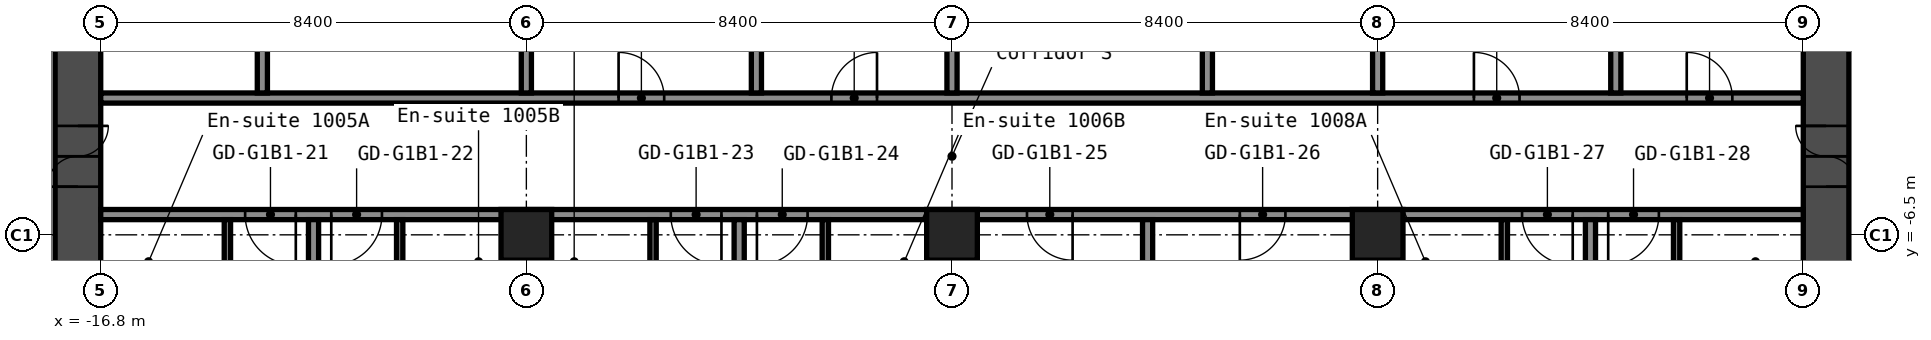
"""IFC4 building model, lengths in metres.
Left out: names, types, materials, properties, quantities, classifications, styles, units other than length and angle.
Written with IfcOpenShell. Run it as: python <this file> out.ifc"""

import sys

from ifc_helpers import new_model, si_unit, direction, frame, frame_2d, origin, origin_2d, place, context, subcontext, project, spatial, rectangle, hollow_rectangle, extrude, element, fill, save


model = new_model("IFC4")
c1 = context("Model", 3, precision=1e-05, world=origin(), true_north=direction((0.0, 1.0)))
c2 = subcontext(c1, "Body", "Model", "MODEL_VIEW")
j1 = project(units=[si_unit("LENGTHUNIT", "METRE"), si_unit("PLANEANGLEUNIT", "RADIAN")], contexts=[c1])
p1 = place(None, origin())
s1 = spatial("IfcSite", under=j1, at=p1, CompositionType="ELEMENT")
p2 = place(p1, origin())
s2 = spatial("IfcBuilding", under=s1, at=p2, CompositionType="ELEMENT")
p3 = place(p2, frame((0.0, 0.0, 39.0)))
s3 = spatial("IfcBuildingStorey", under=s2, at=p3, CompositionType="ELEMENT", Elevation=39.0)
for number, where, z_axis, x_axis in (
    (1, (-8.4, -6.5, 0.0), (0.0, 0.0, 1.0), (1.0, 0.0, 0.0)),
    (2, (0.0, -6.5, 0.0), (0.0, 0.0, 1.0), (1.0, 0.0, 0.0)),
    (3, (8.4, -6.5, 0.0), (0.0, 0.0, 1.0), (1.0, 0.0, 0.0)),
):
    element("IfcColumn", number, at=place(p3, frame(where, z_axis=z_axis, x_axis=x_axis)), inside=s3, PredefinedType="COLUMN", context=c2, shape_type="SweptSolid", body=[
        extrude(hollow_rectangle(XDim=1.0, YDim=1.0, WallThickness=0.04, at=origin_2d()), origin(), (0.0, 0.0, 1.0), 2.8),
    ])
p4 = place(p3, frame((-17.25, -8.4, 0.0), z_axis=(0.0, 0.0, 1.0), x_axis=(0.0, 1.0, 0.0)))
e4 = element("IfcWall", 4, at=p4, inside=s3, PredefinedType="SHEAR", context=c2, shape_type="SweptSolid", body=[
    extrude(rectangle(XDim=16.8, YDim=0.9, at=frame_2d((8.4, 0.0))), origin(), (0.0, 0.0, 1.0), 2.8),
])
p5 = place(p4, frame((12.75, 0.0, 0.0)))
e5 = element("IfcOpeningElement", 5, at=p5, cuts=e4, PredefinedType="OPENING", context=c2, shape_type="SweptSolid", body=[
    extrude(rectangle(XDim=1.2, YDim=2.1, at=frame_2d((0.6, 1.05))), frame((0.0, 0.46, 0.0), z_axis=(0.0, -1.0, 0.0), x_axis=(1.0, 0.0, 0.0)), (0.0, 0.0, 1.0), 0.92),
])
p6 = place(p4, frame((2.85, 0.0, 0.0)))
e6 = element("IfcOpeningElement", 6, at=p6, cuts=e4, PredefinedType="OPENING", context=c2, shape_type="SweptSolid", body=[
    extrude(rectangle(XDim=1.2, YDim=2.1, at=frame_2d((0.6, 1.05))), frame((0.0, 0.46, 0.0), z_axis=(0.0, -1.0, 0.0), x_axis=(1.0, 0.0, 0.0)), (0.0, 0.0, 1.0), 0.92),
])
p7 = place(p3, frame((17.25, -8.4, 0.0), z_axis=(0.0, 0.0, 1.0), x_axis=(0.0, 1.0, 0.0)))
e7 = element("IfcWall", 7, at=p7, inside=s3, PredefinedType="SHEAR", context=c2, shape_type="SweptSolid", body=[
    extrude(rectangle(XDim=16.8, YDim=0.9, at=frame_2d((8.4, 0.0))), origin(), (0.0, 0.0, 1.0), 2.8),
])
p8 = place(p7, frame((12.75, 0.0, 0.0)))
e8 = element("IfcOpeningElement", 8, at=p8, cuts=e7, PredefinedType="OPENING", context=c2, shape_type="SweptSolid", body=[
    extrude(rectangle(XDim=1.2, YDim=2.1, at=frame_2d((0.6, 1.05))), frame((0.0, 0.46, 0.0), z_axis=(0.0, -1.0, 0.0), x_axis=(1.0, 0.0, 0.0)), (0.0, 0.0, 1.0), 0.92),
])
p9 = place(p7, frame((2.85, 0.0, 0.0)))
e9 = element("IfcOpeningElement", 9, at=p9, cuts=e7, PredefinedType="OPENING", context=c2, shape_type="SweptSolid", body=[
    extrude(rectangle(XDim=1.2, YDim=2.1, at=frame_2d((0.6, 1.05))), frame((0.0, 0.46, 0.0), z_axis=(0.0, -1.0, 0.0), x_axis=(1.0, 0.0, 0.0)), (0.0, 0.0, 1.0), 0.92),
])
p10 = place(p3, frame((-16.8, -6.1, 0.0), z_axis=(0.0, 0.0, 1.0), x_axis=(1.0, 0.0, 0.0)))
e10 = element("IfcWall", 10, at=p10, inside=s3, PredefinedType="PARTITIONING", context=c2, shape_type="SweptSolid", body=[
    extrude(rectangle(XDim=33.6, YDim=0.2, at=frame_2d((16.8, 0.0))), origin(), (0.0, 0.0, 1.0), 2.8),
])
p11 = place(p10, frame((2.85, 0.0, 0.0)))
e11 = element("IfcOpeningElement", 11, at=p11, cuts=e10, PredefinedType="OPENING", context=c2, shape_type="SweptSolid", body=[
    extrude(rectangle(XDim=1.0, YDim=2.1, at=frame_2d((0.5, 1.05))), frame((0.0, 0.11, 0.0), z_axis=(0.0, -1.0, 0.0), x_axis=(1.0, 0.0, 0.0)), (0.0, 0.0, 1.0), 0.22),
])
p12 = place(p10, frame((4.55, 0.0, 0.0)))
e12 = element("IfcOpeningElement", 12, at=p12, cuts=e10, PredefinedType="OPENING", context=c2, shape_type="SweptSolid", body=[
    extrude(rectangle(XDim=1.0, YDim=2.1, at=frame_2d((0.5, 1.05))), frame((0.0, 0.11, 0.0), z_axis=(0.0, -1.0, 0.0), x_axis=(1.0, 0.0, 0.0)), (0.0, 0.0, 1.0), 0.22),
])
p13 = place(p10, frame((11.25, 0.0, 0.0)))
e13 = element("IfcOpeningElement", 13, at=p13, cuts=e10, PredefinedType="OPENING", context=c2, shape_type="SweptSolid", body=[
    extrude(rectangle(XDim=1.0, YDim=2.1, at=frame_2d((0.5, 1.05))), frame((0.0, 0.11, 0.0), z_axis=(0.0, -1.0, 0.0), x_axis=(1.0, 0.0, 0.0)), (0.0, 0.0, 1.0), 0.22),
])
p14 = place(p10, frame((12.95, 0.0, 0.0)))
e14 = element("IfcOpeningElement", 14, at=p14, cuts=e10, PredefinedType="OPENING", context=c2, shape_type="SweptSolid", body=[
    extrude(rectangle(XDim=1.0, YDim=2.1, at=frame_2d((0.5, 1.05))), frame((0.0, 0.11, 0.0), z_axis=(0.0, -1.0, 0.0), x_axis=(1.0, 0.0, 0.0)), (0.0, 0.0, 1.0), 0.22),
])
p15 = place(p10, frame((18.28, 0.0, 0.0)))
e15 = element("IfcOpeningElement", 15, at=p15, cuts=e10, PredefinedType="OPENING", context=c2, shape_type="SweptSolid", body=[
    extrude(rectangle(XDim=0.9, YDim=2.1, at=frame_2d((0.45, 1.05))), frame((0.0, 0.11, 0.0), z_axis=(0.0, -1.0, 0.0), x_axis=(1.0, 0.0, 0.0)), (0.0, 0.0, 1.0), 0.22),
])
p16 = place(p10, frame((22.48, 0.0, 0.0)))
e16 = element("IfcOpeningElement", 16, at=p16, cuts=e10, PredefinedType="OPENING", context=c2, shape_type="SweptSolid", body=[
    extrude(rectangle(XDim=0.9, YDim=2.1, at=frame_2d((0.45, 1.05))), frame((0.0, 0.11, 0.0), z_axis=(0.0, -1.0, 0.0), x_axis=(1.0, 0.0, 0.0)), (0.0, 0.0, 1.0), 0.22),
])
p17 = place(p10, frame((28.05, 0.0, 0.0)))
e17 = element("IfcOpeningElement", 17, at=p17, cuts=e10, PredefinedType="OPENING", context=c2, shape_type="SweptSolid", body=[
    extrude(rectangle(XDim=1.0, YDim=2.1, at=frame_2d((0.5, 1.05))), frame((0.0, 0.11, 0.0), z_axis=(0.0, -1.0, 0.0), x_axis=(1.0, 0.0, 0.0)), (0.0, 0.0, 1.0), 0.22),
])
p18 = place(p10, frame((29.75, 0.0, 0.0)))
e18 = element("IfcOpeningElement", 18, at=p18, cuts=e10, PredefinedType="OPENING", context=c2, shape_type="SweptSolid", body=[
    extrude(rectangle(XDim=1.0, YDim=2.1, at=frame_2d((0.5, 1.05))), frame((0.0, 0.11, 0.0), z_axis=(0.0, -1.0, 0.0), x_axis=(1.0, 0.0, 0.0)), (0.0, 0.0, 1.0), 0.22),
])
p19 = place(p3, frame((-16.8, -3.8, 0.0), z_axis=(0.0, 0.0, 1.0), x_axis=(1.0, 0.0, 0.0)))
e19 = element("IfcWall", 19, at=p19, inside=s3, PredefinedType="PARTITIONING", context=c2, shape_type="SweptSolid", body=[
    extrude(rectangle(XDim=33.6, YDim=0.2, at=frame_2d((16.8, 0.0))), origin(), (0.0, 0.0, 1.0), 2.8),
])
p20 = place(p19, frame((10.22, 0.0, 0.0)))
e20 = element("IfcOpeningElement", 20, at=p20, cuts=e19, PredefinedType="OPENING", context=c2, shape_type="SweptSolid", body=[
    extrude(rectangle(XDim=0.9, YDim=2.1, at=frame_2d((0.45, 1.05))), frame((0.0, 0.11, 0.0), z_axis=(0.0, -1.0, 0.0), x_axis=(1.0, 0.0, 0.0)), (0.0, 0.0, 1.0), 0.22),
])
p21 = place(p19, frame((14.42, 0.0, 0.0)))
e21 = element("IfcOpeningElement", 21, at=p21, cuts=e19, PredefinedType="OPENING", context=c2, shape_type="SweptSolid", body=[
    extrude(rectangle(XDim=0.9, YDim=2.1, at=frame_2d((0.45, 1.05))), frame((0.0, 0.11, 0.0), z_axis=(0.0, -1.0, 0.0), x_axis=(1.0, 0.0, 0.0)), (0.0, 0.0, 1.0), 0.22),
])
p22 = place(p19, frame((27.1, 0.0, 0.0)))
e22 = element("IfcOpeningElement", 22, at=p22, cuts=e19, PredefinedType="OPENING", context=c2, shape_type="SweptSolid", body=[
    extrude(rectangle(XDim=0.9, YDim=2.1, at=frame_2d((0.45, 1.05))), frame((0.0, 0.11, 0.0), z_axis=(0.0, -1.0, 0.0), x_axis=(1.0, 0.0, 0.0)), (0.0, 0.0, 1.0), 0.22),
])
p23 = place(p19, frame((31.3, 0.0, 0.0)))
e23 = element("IfcOpeningElement", 23, at=p23, cuts=e19, PredefinedType="OPENING", context=c2, shape_type="SweptSolid", body=[
    extrude(rectangle(XDim=0.9, YDim=2.1, at=frame_2d((0.45, 1.05))), frame((0.0, 0.11, 0.0), z_axis=(0.0, -1.0, 0.0), x_axis=(1.0, 0.0, 0.0)), (0.0, 0.0, 1.0), 0.22),
])
p24 = place(p3, frame((-14.3, -9.1, 0.0), z_axis=(0.0, 0.0, 1.0), x_axis=(0.0, 1.0, 0.0)))
e24 = element("IfcWall", 24, at=p24, inside=s3, PredefinedType="PARTITIONING", context=c2, shape_type="SweptSolid", body=[
    extrude(rectangle(XDim=2.9, YDim=0.125, at=frame_2d((1.45, 0.0))), origin(), (0.0, 0.0, 1.0), 2.8),
])
p25 = place(p24, frame((0.6, 0.0, 0.0)))
e25 = element("IfcOpeningElement", 25, at=p25, cuts=e24, PredefinedType="OPENING", context=c2, shape_type="SweptSolid", body=[
    extrude(rectangle(XDim=0.8, YDim=2.1, at=frame_2d((0.4, 1.05))), frame((0.0, 0.073, 0.0), z_axis=(0.0, -1.0, 0.0), x_axis=(1.0, 0.0, 0.0)), (0.0, 0.0, 1.0), 0.145),
])
p26 = place(p3, frame((-13.61, -3.7, 0.0), z_axis=(0.0, 0.0, 1.0), x_axis=(0.0, 1.0, 0.0)))
e26 = element("IfcWall", 26, at=p26, inside=s3, PredefinedType="PARTITIONING", context=c2, shape_type="SweptSolid", body=[
    extrude(rectangle(XDim=7.4, YDim=0.2, at=frame_2d((3.7, 0.0))), origin(), (0.0, 0.0, 1.0), 2.8),
])
p27 = place(p3, frame((-12.6, -20.3, 0.0), z_axis=(0.0, 0.0, 1.0), x_axis=(0.0, 1.0, 0.0)))
e27 = element("IfcWall", 27, at=p27, inside=s3, PredefinedType="PARTITIONING", context=c2, shape_type="SweptSolid", body=[
    extrude(rectangle(XDim=14.1, YDim=0.2, at=frame_2d((7.05, 0.0))), origin(), (0.0, 0.0, 1.0), 2.8),
])
p28 = place(p3, frame((-10.9, -9.1, 0.0), z_axis=(0.0, 0.0, 1.0), x_axis=(0.0, 1.0, 0.0)))
e28 = element("IfcWall", 28, at=p28, inside=s3, PredefinedType="PARTITIONING", context=c2, shape_type="SweptSolid", body=[
    extrude(rectangle(XDim=2.9, YDim=0.125, at=frame_2d((1.45, 0.0))), origin(), (0.0, 0.0, 1.0), 2.8),
])
p29 = place(p28, frame((0.6, 0.0, 0.0)))
e29 = element("IfcOpeningElement", 29, at=p29, cuts=e28, PredefinedType="OPENING", context=c2, shape_type="SweptSolid", body=[
    extrude(rectangle(XDim=0.8, YDim=2.1, at=frame_2d((0.4, 1.05))), frame((0.0, 0.073, 0.0), z_axis=(0.0, -1.0, 0.0), x_axis=(1.0, 0.0, 0.0)), (0.0, 0.0, 1.0), 0.145),
])
p30 = place(p3, frame((-8.4, -20.3, 0.0), z_axis=(0.0, 0.0, 1.0), x_axis=(0.0, 1.0, 0.0)))
e30 = element("IfcWall", 30, at=p30, inside=s3, PredefinedType="PARTITIONING", context=c2, shape_type="SweptSolid", body=[
    extrude(rectangle(XDim=13.31, YDim=0.2, at=frame_2d((6.655, 0.0))), origin(), (0.0, 0.0, 1.0), 2.8),
])
p31 = place(p3, frame((-8.4, -3.7, 0.0), z_axis=(0.0, 0.0, 1.0), x_axis=(0.0, 1.0, 0.0)))
e31 = element("IfcWall", 31, at=p31, inside=s3, PredefinedType="PARTITIONING", context=c2, shape_type="SweptSolid", body=[
    extrude(rectangle(XDim=7.4, YDim=0.2, at=frame_2d((3.7, 0.0))), origin(), (0.0, 0.0, 1.0), 2.8),
])
p32 = place(p3, frame((-5.9, -9.1, 0.0), z_axis=(0.0, 0.0, 1.0), x_axis=(0.0, 1.0, 0.0)))
e32 = element("IfcWall", 32, at=p32, inside=s3, PredefinedType="PARTITIONING", context=c2, shape_type="SweptSolid", body=[
    extrude(rectangle(XDim=2.9, YDim=0.125, at=frame_2d((1.45, 0.0))), origin(), (0.0, 0.0, 1.0), 2.8),
])
p33 = place(p32, frame((0.6, 0.0, 0.0)))
e33 = element("IfcOpeningElement", 33, at=p33, cuts=e32, PredefinedType="OPENING", context=c2, shape_type="SweptSolid", body=[
    extrude(rectangle(XDim=0.8, YDim=2.1, at=frame_2d((0.4, 1.05))), frame((0.0, 0.073, 0.0), z_axis=(0.0, -1.0, 0.0), x_axis=(1.0, 0.0, 0.0)), (0.0, 0.0, 1.0), 0.145),
])
p34 = place(p3, frame((-4.2, -20.3, 0.0), z_axis=(0.0, 0.0, 1.0), x_axis=(0.0, 1.0, 0.0)))
e34 = element("IfcWall", 34, at=p34, inside=s3, PredefinedType="PARTITIONING", context=c2, shape_type="SweptSolid", body=[
    extrude(rectangle(XDim=14.1, YDim=0.2, at=frame_2d((7.05, 0.0))), origin(), (0.0, 0.0, 1.0), 2.8),
])
p35 = place(p3, frame((-3.86, -3.7, 0.0), z_axis=(0.0, 0.0, 1.0), x_axis=(0.0, 1.0, 0.0)))
e35 = element("IfcWall", 35, at=p35, inside=s3, PredefinedType="PARTITIONING", context=c2, shape_type="SweptSolid", body=[
    extrude(rectangle(XDim=7.4, YDim=0.2, at=frame_2d((3.7, 0.0))), origin(), (0.0, 0.0, 1.0), 2.8),
])
p36 = place(p3, frame((-2.5, -9.1, 0.0), z_axis=(0.0, 0.0, 1.0), x_axis=(0.0, 1.0, 0.0)))
e36 = element("IfcWall", 36, at=p36, inside=s3, PredefinedType="PARTITIONING", context=c2, shape_type="SweptSolid", body=[
    extrude(rectangle(XDim=2.9, YDim=0.125, at=frame_2d((1.45, 0.0))), origin(), (0.0, 0.0, 1.0), 2.8),
])
p37 = place(p36, frame((0.6, 0.0, 0.0)))
e37 = element("IfcOpeningElement", 37, at=p37, cuts=e36, PredefinedType="OPENING", context=c2, shape_type="SweptSolid", body=[
    extrude(rectangle(XDim=0.8, YDim=2.1, at=frame_2d((0.4, 1.05))), frame((0.0, 0.073, 0.0), z_axis=(0.0, -1.0, 0.0), x_axis=(1.0, 0.0, 0.0)), (0.0, 0.0, 1.0), 0.145),
])
p38 = place(p3, frame((0.0, -20.3, 0.0), z_axis=(0.0, 0.0, 1.0), x_axis=(0.0, 1.0, 0.0)))
e38 = element("IfcWall", 38, at=p38, inside=s3, PredefinedType="PARTITIONING", context=c2, shape_type="SweptSolid", body=[
    extrude(rectangle(XDim=13.31, YDim=0.2, at=frame_2d((6.655, 0.0))), origin(), (0.0, 0.0, 1.0), 2.8),
])
p39 = place(p3, frame((0.0, -3.7, 0.0), z_axis=(0.0, 0.0, 1.0), x_axis=(0.0, 1.0, 0.0)))
e39 = element("IfcWall", 39, at=p39, inside=s3, PredefinedType="PARTITIONING", context=c2, shape_type="SweptSolid", body=[
    extrude(rectangle(XDim=7.4, YDim=0.2, at=frame_2d((3.7, 0.0))), origin(), (0.0, 0.0, 1.0), 2.8),
])
p40 = place(p3, frame((3.86, -20.3, 0.0), z_axis=(0.0, 0.0, 1.0), x_axis=(0.0, 1.0, 0.0)))
e40 = element("IfcWall", 40, at=p40, inside=s3, PredefinedType="PARTITIONING", context=c2, shape_type="SweptSolid", body=[
    extrude(rectangle(XDim=14.1, YDim=0.2, at=frame_2d((7.05, 0.0))), origin(), (0.0, 0.0, 1.0), 2.8),
])
p41 = place(p3, frame((5.04, -3.7, 0.0), z_axis=(0.0, 0.0, 1.0), x_axis=(0.0, 1.0, 0.0)))
e41 = element("IfcWall", 41, at=p41, inside=s3, PredefinedType="PARTITIONING", context=c2, shape_type="SweptSolid", body=[
    extrude(rectangle(XDim=7.4, YDim=0.2, at=frame_2d((3.7, 0.0))), origin(), (0.0, 0.0, 1.0), 2.8),
])
p42 = place(p3, frame((8.4, -20.3, 0.0), z_axis=(0.0, 0.0, 1.0), x_axis=(0.0, 1.0, 0.0)))
e42 = element("IfcWall", 42, at=p42, inside=s3, PredefinedType="PARTITIONING", context=c2, shape_type="SweptSolid", body=[
    extrude(rectangle(XDim=13.31, YDim=0.2, at=frame_2d((6.655, 0.0))), origin(), (0.0, 0.0, 1.0), 2.8),
])
p43 = place(p3, frame((8.4, -3.7, 0.0), z_axis=(0.0, 0.0, 1.0), x_axis=(0.0, 1.0, 0.0)))
e43 = element("IfcWall", 43, at=p43, inside=s3, PredefinedType="PARTITIONING", context=c2, shape_type="SweptSolid", body=[
    extrude(rectangle(XDim=7.4, YDim=0.2, at=frame_2d((3.7, 0.0))), origin(), (0.0, 0.0, 1.0), 2.8),
])
p44 = place(p3, frame((10.9, -9.1, 0.0), z_axis=(0.0, 0.0, 1.0), x_axis=(0.0, 1.0, 0.0)))
e44 = element("IfcWall", 44, at=p44, inside=s3, PredefinedType="PARTITIONING", context=c2, shape_type="SweptSolid", body=[
    extrude(rectangle(XDim=2.9, YDim=0.125, at=frame_2d((1.45, 0.0))), origin(), (0.0, 0.0, 1.0), 2.8),
])
p45 = place(p44, frame((0.6, 0.0, 0.0)))
e45 = element("IfcOpeningElement", 45, at=p45, cuts=e44, PredefinedType="OPENING", context=c2, shape_type="SweptSolid", body=[
    extrude(rectangle(XDim=0.8, YDim=2.1, at=frame_2d((0.4, 1.05))), frame((0.0, 0.073, 0.0), z_axis=(0.0, -1.0, 0.0), x_axis=(1.0, 0.0, 0.0)), (0.0, 0.0, 1.0), 0.145),
])
p46 = place(p3, frame((12.6, -20.3, 0.0), z_axis=(0.0, 0.0, 1.0), x_axis=(0.0, 1.0, 0.0)))
e46 = element("IfcWall", 46, at=p46, inside=s3, PredefinedType="PARTITIONING", context=c2, shape_type="SweptSolid", body=[
    extrude(rectangle(XDim=14.1, YDim=0.2, at=frame_2d((7.05, 0.0))), origin(), (0.0, 0.0, 1.0), 2.8),
])
p47 = place(p3, frame((13.1, -3.7, 0.0), z_axis=(0.0, 0.0, 1.0), x_axis=(0.0, 1.0, 0.0)))
e47 = element("IfcWall", 47, at=p47, inside=s3, PredefinedType="PARTITIONING", context=c2, shape_type="SweptSolid", body=[
    extrude(rectangle(XDim=7.4, YDim=0.2, at=frame_2d((3.7, 0.0))), origin(), (0.0, 0.0, 1.0), 2.8),
])
p48 = place(p3, frame((14.3, -9.1, 0.0), z_axis=(0.0, 0.0, 1.0), x_axis=(0.0, 1.0, 0.0)))
e48 = element("IfcWall", 48, at=p48, inside=s3, PredefinedType="PARTITIONING", context=c2, shape_type="SweptSolid", body=[
    extrude(rectangle(XDim=2.9, YDim=0.125, at=frame_2d((1.45, 0.0))), origin(), (0.0, 0.0, 1.0), 2.8),
])
p49 = place(p48, frame((0.6, 0.0, 0.0)))
e49 = element("IfcOpeningElement", 49, at=p49, cuts=e48, PredefinedType="OPENING", context=c2, shape_type="SweptSolid", body=[
    extrude(rectangle(XDim=0.8, YDim=2.1, at=frame_2d((0.4, 1.05))), frame((0.0, 0.073, 0.0), z_axis=(0.0, -1.0, 0.0), x_axis=(1.0, 0.0, 0.0)), (0.0, 0.0, 1.0), 0.145),
])
p50 = place(p6, origin())
e50 = element("IfcDoor", 50, at=p50, inside=s3, OperationType="DOUBLE_DOOR_SINGLE_SWING", PredefinedType="DOOR", context=c2, shape_type="SweptSolid", body=[
    extrude(rectangle(XDim=1.2, YDim=2.1, at=frame_2d((0.6, 1.05))), frame((0.0, 0.025, 0.0), z_axis=(0.0, -1.0, 0.0), x_axis=(1.0, 0.0, 0.0)), (0.0, 0.0, 1.0), 0.05),
])
fill(e6, e50)
p51 = place(p9, origin())
e51 = element("IfcDoor", 51, at=p51, inside=s3, OperationType="DOUBLE_DOOR_SINGLE_SWING", PredefinedType="DOOR", context=c2, shape_type="SweptSolid", body=[
    extrude(rectangle(XDim=1.2, YDim=2.1, at=frame_2d((0.6, 1.05))), frame((0.0, 0.025, 0.0), z_axis=(0.0, -1.0, 0.0), x_axis=(1.0, 0.0, 0.0)), (0.0, 0.0, 1.0), 0.05),
])
fill(e9, e51)
p52 = place(p11, origin())
e52 = element("IfcDoor", 52, at=p52, inside=s3, OperationType="SINGLE_SWING_RIGHT", PredefinedType="DOOR", context=c2, shape_type="SweptSolid", body=[
    extrude(rectangle(XDim=1.0, YDim=2.1, at=frame_2d((0.5, 1.05))), frame((0.0, 0.025, 0.0), z_axis=(0.0, -1.0, 0.0), x_axis=(1.0, 0.0, 0.0)), (0.0, 0.0, 1.0), 0.05),
])
fill(e11, e52)
p53 = place(p12, origin())
e53 = element("IfcDoor", 53, at=p53, inside=s3, OperationType="SINGLE_SWING_LEFT", PredefinedType="DOOR", context=c2, shape_type="SweptSolid", body=[
    extrude(rectangle(XDim=1.0, YDim=2.1, at=frame_2d((0.5, 1.05))), frame((0.0, 0.025, 0.0), z_axis=(0.0, -1.0, 0.0), x_axis=(1.0, 0.0, 0.0)), (0.0, 0.0, 1.0), 0.05),
])
fill(e12, e53)
p54 = place(p13, origin())
e54 = element("IfcDoor", 54, at=p54, inside=s3, OperationType="SINGLE_SWING_RIGHT", PredefinedType="DOOR", context=c2, shape_type="SweptSolid", body=[
    extrude(rectangle(XDim=1.0, YDim=2.1, at=frame_2d((0.5, 1.05))), frame((0.0, 0.025, 0.0), z_axis=(0.0, -1.0, 0.0), x_axis=(1.0, 0.0, 0.0)), (0.0, 0.0, 1.0), 0.05),
])
fill(e13, e54)
p55 = place(p14, origin())
e55 = element("IfcDoor", 55, at=p55, inside=s3, OperationType="SINGLE_SWING_LEFT", PredefinedType="DOOR", context=c2, shape_type="SweptSolid", body=[
    extrude(rectangle(XDim=1.0, YDim=2.1, at=frame_2d((0.5, 1.05))), frame((0.0, 0.025, 0.0), z_axis=(0.0, -1.0, 0.0), x_axis=(1.0, 0.0, 0.0)), (0.0, 0.0, 1.0), 0.05),
])
fill(e14, e55)
p56 = place(p15, origin())
e56 = element("IfcDoor", 56, at=p56, inside=s3, OperationType="SINGLE_SWING_RIGHT", PredefinedType="DOOR", context=c2, shape_type="SweptSolid", body=[
    extrude(rectangle(XDim=0.9, YDim=2.1, at=frame_2d((0.45, 1.05))), frame((0.0, 0.025, 0.0), z_axis=(0.0, -1.0, 0.0), x_axis=(1.0, 0.0, 0.0)), (0.0, 0.0, 1.0), 0.05),
])
fill(e15, e56)
p57 = place(p16, origin())
e57 = element("IfcDoor", 57, at=p57, inside=s3, OperationType="SINGLE_SWING_LEFT", PredefinedType="DOOR", context=c2, shape_type="SweptSolid", body=[
    extrude(rectangle(XDim=0.9, YDim=2.1, at=frame_2d((0.45, 1.05))), frame((0.0, 0.025, 0.0), z_axis=(0.0, -1.0, 0.0), x_axis=(1.0, 0.0, 0.0)), (0.0, 0.0, 1.0), 0.05),
])
fill(e16, e57)
p58 = place(p17, origin())
e58 = element("IfcDoor", 58, at=p58, inside=s3, OperationType="SINGLE_SWING_RIGHT", PredefinedType="DOOR", context=c2, shape_type="SweptSolid", body=[
    extrude(rectangle(XDim=1.0, YDim=2.1, at=frame_2d((0.5, 1.05))), frame((0.0, 0.025, 0.0), z_axis=(0.0, -1.0, 0.0), x_axis=(1.0, 0.0, 0.0)), (0.0, 0.0, 1.0), 0.05),
])
fill(e17, e58)
p59 = place(p18, origin())
e59 = element("IfcDoor", 59, at=p59, inside=s3, OperationType="SINGLE_SWING_LEFT", PredefinedType="DOOR", context=c2, shape_type="SweptSolid", body=[
    extrude(rectangle(XDim=1.0, YDim=2.1, at=frame_2d((0.5, 1.05))), frame((0.0, 0.025, 0.0), z_axis=(0.0, -1.0, 0.0), x_axis=(1.0, 0.0, 0.0)), (0.0, 0.0, 1.0), 0.05),
])
fill(e18, e59)
p60 = place(p20, origin())
e60 = element("IfcDoor", 60, at=p60, inside=s3, OperationType="SINGLE_SWING_RIGHT", PredefinedType="DOOR", context=c2, shape_type="SweptSolid", body=[
    extrude(rectangle(XDim=0.9, YDim=2.1, at=frame_2d((0.45, 1.05))), frame((0.0, 0.025, 0.0), z_axis=(0.0, -1.0, 0.0), x_axis=(1.0, 0.0, 0.0)), (0.0, 0.0, 1.0), 0.05),
])
fill(e20, e60)
p61 = place(p21, origin())
e61 = element("IfcDoor", 61, at=p61, inside=s3, OperationType="SINGLE_SWING_LEFT", PredefinedType="DOOR", context=c2, shape_type="SweptSolid", body=[
    extrude(rectangle(XDim=0.9, YDim=2.1, at=frame_2d((0.45, 1.05))), frame((0.0, 0.025, 0.0), z_axis=(0.0, -1.0, 0.0), x_axis=(1.0, 0.0, 0.0)), (0.0, 0.0, 1.0), 0.05),
])
fill(e21, e61)
p62 = place(p22, origin())
e62 = element("IfcDoor", 62, at=p62, inside=s3, OperationType="SINGLE_SWING_RIGHT", PredefinedType="DOOR", context=c2, shape_type="SweptSolid", body=[
    extrude(rectangle(XDim=0.9, YDim=2.1, at=frame_2d((0.45, 1.05))), frame((0.0, 0.025, 0.0), z_axis=(0.0, -1.0, 0.0), x_axis=(1.0, 0.0, 0.0)), (0.0, 0.0, 1.0), 0.05),
])
fill(e22, e62)
p63 = place(p23, origin())
e63 = element("IfcDoor", 63, at=p63, inside=s3, OperationType="SINGLE_SWING_RIGHT", PredefinedType="DOOR", context=c2, shape_type="SweptSolid", body=[
    extrude(rectangle(XDim=0.9, YDim=2.1, at=frame_2d((0.45, 1.05))), frame((0.0, 0.025, 0.0), z_axis=(0.0, -1.0, 0.0), x_axis=(1.0, 0.0, 0.0)), (0.0, 0.0, 1.0), 0.05),
])
fill(e23, e63)
save(model, sys.argv[1])
